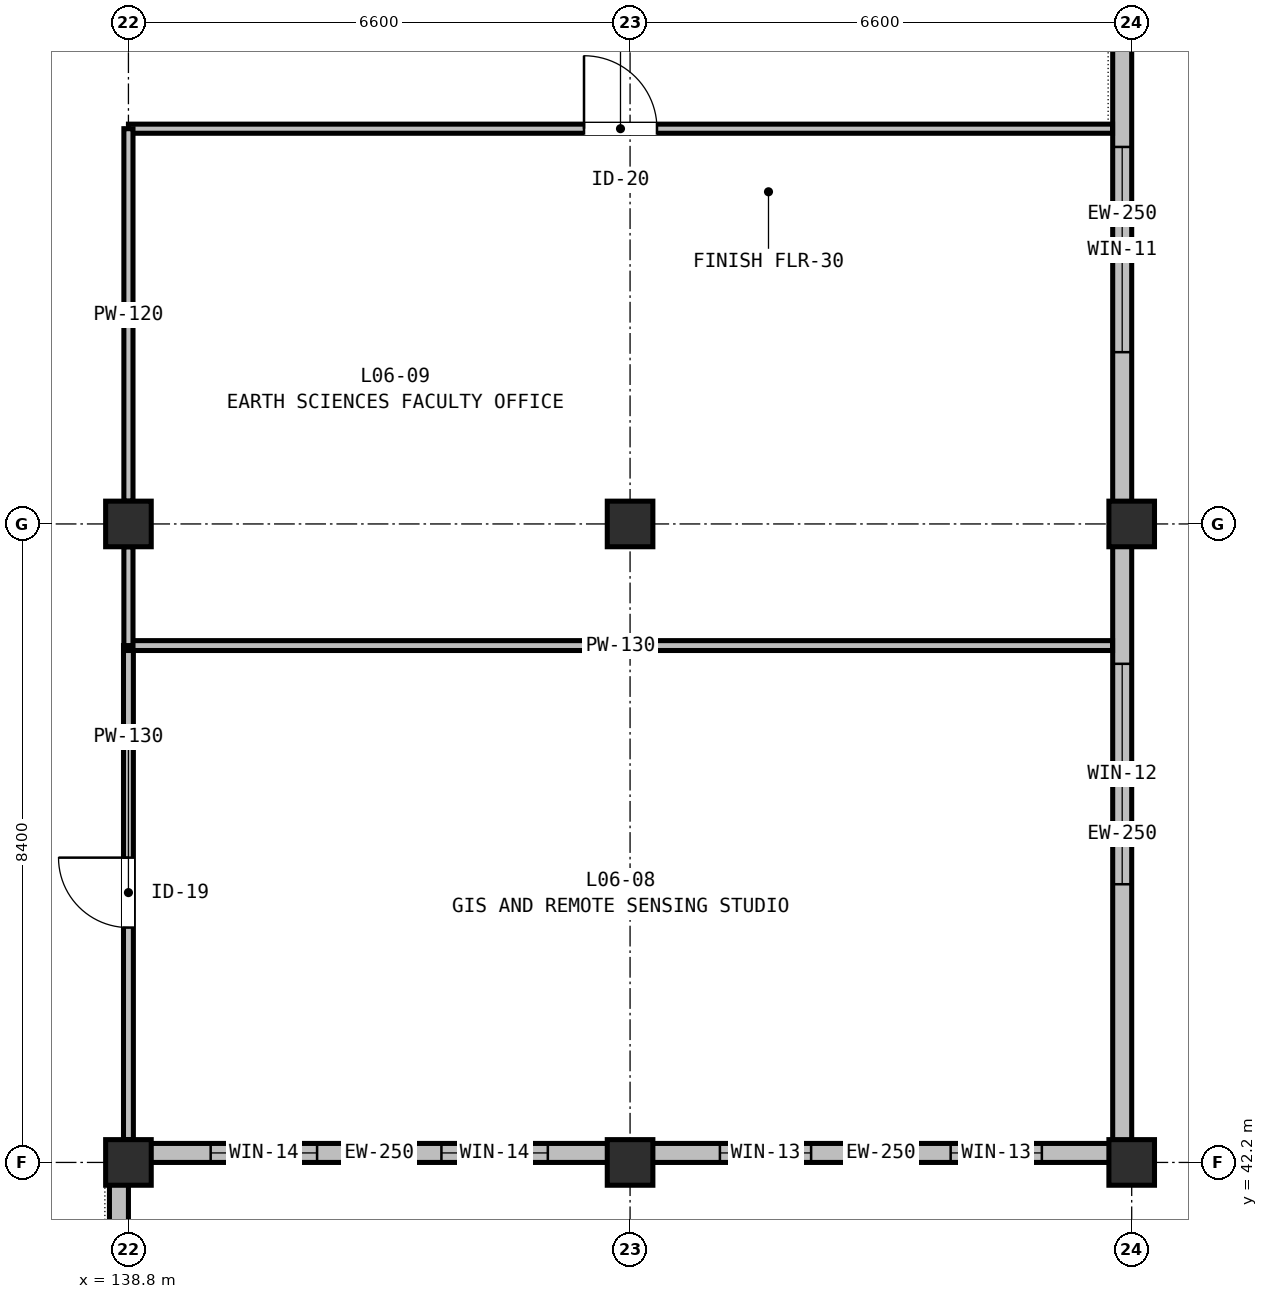
"""IFC4 building model, lengths in metres.
Left out: names, types, materials, properties, quantities, classifications, styles, units other than length and angle.
Written with IfcOpenShell. Run it as: python <this file> out.ifc"""

import sys

from ifc_helpers import new_model, si_unit, direction, frame, frame_2d, origin, origin_2d, place, context, subcontext, project, spatial, rectangle, extrude, element, fill, save


model = new_model("IFC4")
c1 = context("Model", 3, precision=1e-05, world=origin(), true_north=direction((0.0, 1.0)))
c2 = subcontext(c1, "Body", "Model", "MODEL_VIEW")
j1 = project(units=[si_unit("LENGTHUNIT", "METRE"), si_unit("PLANEANGLEUNIT", "RADIAN")], contexts=[c1])
p1 = place(None, origin())
s1 = spatial("IfcSite", under=j1, at=p1, CompositionType="ELEMENT")
p2 = place(p1, origin())
s2 = spatial("IfcBuilding", under=s1, at=p2, CompositionType="ELEMENT")
p3 = place(p2, frame((0.0, 0.0, 28.5)))
s3 = spatial("IfcBuildingStorey", under=s2, at=p3, CompositionType="ELEMENT", Elevation=28.5)
for number, where, z_axis, x_axis in (
    (1, (138.8, 42.2, 0.0), (0.0, 0.0, 1.0), (1.0, 0.0, 0.0)),
    (2, (138.8, 50.6, 0.0), (0.0, 0.0, 1.0), (1.0, 0.0, 0.0)),
    (3, (145.4, 42.2, 0.0), (0.0, 0.0, 1.0), (1.0, 0.0, 0.0)),
    (4, (145.4, 50.6, 0.0), (0.0, 0.0, 1.0), (1.0, 0.0, 0.0)),
    (5, (152.0, 42.2, 0.0), (0.0, 0.0, 1.0), (1.0, 0.0, 0.0)),
    (6, (152.0, 50.6, 0.0), (0.0, 0.0, 1.0), (1.0, 0.0, 0.0)),
):
    element("IfcColumn", number, at=place(p3, frame(where, z_axis=z_axis, x_axis=x_axis)), inside=s3, PredefinedType="COLUMN", context=c2, shape_type="SweptSolid", body=[
        extrude(rectangle(XDim=0.6, YDim=0.6, at=origin_2d()), origin(), (0.0, 0.0, 1.0), 4.14),
    ])
p4 = place(p3, frame((151.875, 58.75, 0.0), z_axis=(0.0, 0.0, 1.0), x_axis=(0.0, -1.0, 0.0)))
e7 = element("IfcWall", 7, at=p4, inside=s3, PredefinedType="STANDARD", context=c2, shape_type="SweptSolid", body=[
    extrude(rectangle(XDim=8.15, YDim=0.25, at=frame_2d((4.075, 0.0))), origin(), (0.0, 0.0, 1.0), 3.585),
])
p5 = place(p4, frame((3.19, 0.0, 0.75)))
e8 = element("IfcOpeningElement", 8, at=p5, cuts=e7, PredefinedType="OPENING", context=c2, shape_type="SweptSolid", body=[
    extrude(rectangle(XDim=2.7, YDim=2.2, at=frame_2d((1.35, 1.1))), frame((0.0, 0.135, 0.0), z_axis=(0.0, -1.0, 0.0), x_axis=(1.0, 0.0, 0.0)), (0.0, 0.0, 1.0), 0.27),
])
p6 = place(p3, frame((151.875, 50.6, 0.0), z_axis=(0.0, 0.0, 1.0), x_axis=(0.0, -1.0, 0.0)))
e9 = element("IfcWall", 9, at=p6, inside=s3, PredefinedType="STANDARD", context=c2, shape_type="SweptSolid", body=[
    extrude(rectangle(XDim=8.15, YDim=0.25, at=frame_2d((4.075, 0.0))), origin(), (0.0, 0.0, 1.0), 3.585),
])
p7 = place(p6, frame((1.84, 0.0, 0.75)))
e10 = element("IfcOpeningElement", 10, at=p7, cuts=e9, PredefinedType="OPENING", context=c2, shape_type="SweptSolid", body=[
    extrude(rectangle(XDim=2.9, YDim=2.2, at=frame_2d((1.45, 1.1))), frame((0.0, 0.135, 0.0), z_axis=(0.0, -1.0, 0.0), x_axis=(1.0, 0.0, 0.0)), (0.0, 0.0, 1.0), 0.27),
])
p8 = place(p3, frame((152.0, 42.325, 0.0), z_axis=(0.0, 0.0, 1.0), x_axis=(-1.0, 0.0, 0.0)))
e11 = element("IfcWall", 11, at=p8, inside=s3, PredefinedType="STANDARD", context=c2, shape_type="SweptSolid", body=[
    extrude(rectangle(XDim=6.6, YDim=0.25, at=frame_2d((3.3, 0.0))), origin(), (0.0, 0.0, 1.0), 3.435),
])
p9 = place(p8, frame((1.182, 0.0, 0.9)))
e12 = element("IfcOpeningElement", 12, at=p9, cuts=e11, PredefinedType="OPENING", context=c2, shape_type="SweptSolid", body=[
    extrude(rectangle(XDim=1.2, YDim=1.5, at=frame_2d((0.6, 0.75))), frame((0.0, 0.135, 0.0), z_axis=(0.0, -1.0, 0.0), x_axis=(1.0, 0.0, 0.0)), (0.0, 0.0, 1.0), 0.27),
])
p10 = place(p8, frame((4.218, 0.0, 0.9)))
e13 = element("IfcOpeningElement", 13, at=p10, cuts=e11, PredefinedType="OPENING", context=c2, shape_type="SweptSolid", body=[
    extrude(rectangle(XDim=1.2, YDim=1.5, at=frame_2d((0.6, 0.75))), frame((0.0, 0.135, 0.0), z_axis=(0.0, -1.0, 0.0), x_axis=(1.0, 0.0, 0.0)), (0.0, 0.0, 1.0), 0.27),
])
p11 = place(p3, frame((145.4, 42.325, 0.0), z_axis=(0.0, 0.0, 1.0), x_axis=(-1.0, 0.0, 0.0)))
e14 = element("IfcWall", 14, at=p11, inside=s3, PredefinedType="STANDARD", context=c2, shape_type="SweptSolid", body=[
    extrude(rectangle(XDim=6.6, YDim=0.25, at=frame_2d((3.3, 0.0))), origin(), (0.0, 0.0, 1.0), 3.435),
])
p12 = place(p11, frame((1.082, 0.0, 0.9)))
e15 = element("IfcOpeningElement", 15, at=p12, cuts=e14, PredefinedType="OPENING", context=c2, shape_type="SweptSolid", body=[
    extrude(rectangle(XDim=1.4, YDim=1.55, at=frame_2d((0.7, 0.775))), frame((0.0, 0.135, 0.0), z_axis=(0.0, -1.0, 0.0), x_axis=(1.0, 0.0, 0.0)), (0.0, 0.0, 1.0), 0.27),
])
p13 = place(p11, frame((4.118, 0.0, 0.9)))
e16 = element("IfcOpeningElement", 16, at=p13, cuts=e14, PredefinedType="OPENING", context=c2, shape_type="SweptSolid", body=[
    extrude(rectangle(XDim=1.4, YDim=1.55, at=frame_2d((0.7, 0.775))), frame((0.0, 0.135, 0.0), z_axis=(0.0, -1.0, 0.0), x_axis=(1.0, 0.0, 0.0)), (0.0, 0.0, 1.0), 0.27),
])
p14 = place(p3, frame((138.675, 41.95, 0.0), z_axis=(0.0, 0.0, 1.0), x_axis=(0.0, -1.0, 0.0)))
e17 = element("IfcWall", 17, at=p14, inside=s3, PredefinedType="STANDARD", context=c2, shape_type="SweptSolid", body=[
    extrude(rectangle(XDim=7.9, YDim=0.25, at=frame_2d((3.95, 0.0))), origin(), (0.0, 0.0, 1.0), 3.585),
])
p15 = place(p14, frame((1.333, 0.0, 0.9)))
e18 = element("IfcOpeningElement", 18, at=p15, cuts=e17, PredefinedType="OPENING", context=c2, shape_type="SweptSolid", body=[
    extrude(rectangle(XDim=1.6, YDim=1.6, at=frame_2d((0.8, 0.8))), frame((0.0, 0.135, 0.0), z_axis=(0.0, -1.0, 0.0), x_axis=(1.0, 0.0, 0.0)), (0.0, 0.0, 1.0), 0.27),
])
p16 = place(p14, frame((4.967, 0.0, 0.9)))
e19 = element("IfcOpeningElement", 19, at=p16, cuts=e17, PredefinedType="OPENING", context=c2, shape_type="SweptSolid", body=[
    extrude(rectangle(XDim=1.6, YDim=1.6, at=frame_2d((0.8, 0.8))), frame((0.0, 0.135, 0.0), z_axis=(0.0, -1.0, 0.0), x_axis=(1.0, 0.0, 0.0)), (0.0, 0.0, 1.0), 0.27),
])
p17 = place(p3, frame((138.8, 42.5, 0.0), z_axis=(0.0, 0.0, 1.0), x_axis=(0.0, 1.0, 0.0)))
e20 = element("IfcWall", 20, at=p17, inside=s3, PredefinedType="PARTITIONING", context=c2, shape_type="SweptSolid", body=[
    extrude(rectangle(XDim=6.5, YDim=0.13, at=frame_2d((3.25, 0.0))), origin(), (0.0, 0.0, 1.0), 3.435),
])
p18 = place(p17, frame((2.79, 0.0, 0.0)))
e21 = element("IfcOpeningElement", 21, at=p18, cuts=e20, PredefinedType="OPENING", context=c2, shape_type="SweptSolid", body=[
    extrude(rectangle(XDim=0.92, YDim=2.14, at=frame_2d((0.46, 1.07))), frame((0.0, 0.075, 0.0), z_axis=(0.0, -1.0, 0.0), x_axis=(1.0, 0.0, 0.0)), (0.0, 0.0, 1.0), 0.15),
])
p19 = place(p3, frame((138.8, 49.0, 0.0), z_axis=(0.0, 0.0, 1.0), x_axis=(1.0, 0.0, 0.0)))
e22 = element("IfcWall", 22, at=p19, inside=s3, PredefinedType="PARTITIONING", context=c2, shape_type="SweptSolid", body=[
    extrude(rectangle(XDim=12.948, YDim=0.13, at=frame_2d((6.474, 0.0))), origin(), (0.0, 0.0, 1.0), 3.435),
])
p20 = place(p3, frame((138.8, 55.8, 0.0), z_axis=(0.0, 0.0, 1.0), x_axis=(1.0, 0.0, 0.0)))
e23 = element("IfcWall", 23, at=p20, inside=s3, PredefinedType="PARTITIONING", context=c2, shape_type="SweptSolid", body=[
    extrude(rectangle(XDim=12.948, YDim=0.12, at=frame_2d((6.474, 0.0))), origin(), (0.0, 0.0, 1.0), 3.435),
])
p21 = place(p20, frame((5.994, 0.0, 0.0)))
e24 = element("IfcOpeningElement", 24, at=p21, cuts=e23, PredefinedType="OPENING", context=c2, shape_type="SweptSolid", body=[
    extrude(rectangle(XDim=0.96, YDim=2.14, at=frame_2d((0.48, 1.07))), frame((0.0, 0.07, 0.0), z_axis=(0.0, -1.0, 0.0), x_axis=(1.0, 0.0, 0.0)), (0.0, 0.0, 1.0), 0.14),
])
p22 = place(p3, frame((138.8, 49.0, 0.0), z_axis=(0.0, 0.0, 1.0), x_axis=(0.0, 1.0, 0.0)))
e25 = element("IfcWall", 25, at=p22, inside=s3, PredefinedType="PARTITIONING", context=c2, shape_type="SweptSolid", body=[
    extrude(rectangle(XDim=1.3, YDim=0.12, at=frame_2d((0.65, 0.0))), origin(), (0.0, 0.0, 1.0), 3.435),
])
p23 = place(p3, frame((138.8, 50.9, 0.0), z_axis=(0.0, 0.0, 1.0), x_axis=(0.0, 1.0, 0.0)))
e26 = element("IfcWall", 26, at=p23, inside=s3, PredefinedType="PARTITIONING", context=c2, shape_type="SweptSolid", body=[
    extrude(rectangle(XDim=4.9, YDim=0.12, at=frame_2d((2.45, 0.0))), origin(), (0.0, 0.0, 1.0), 3.435),
])
p24 = place(p5, origin())
e27 = element("IfcWindow", 27, at=p24, inside=s3, PartitioningType="SINGLE_PANEL", PredefinedType="WINDOW", context=c2, shape_type="SweptSolid", body=[
    extrude(rectangle(XDim=2.7, YDim=2.2, at=frame_2d((1.35, 1.1))), frame((0.0, 0.03, 0.0), z_axis=(0.0, -1.0, 0.0), x_axis=(1.0, 0.0, 0.0)), (0.0, 0.0, 1.0), 0.06),
])
fill(e8, e27)
p25 = place(p7, origin())
e28 = element("IfcWindow", 28, at=p25, inside=s3, PartitioningType="SINGLE_PANEL", PredefinedType="WINDOW", context=c2, shape_type="SweptSolid", body=[
    extrude(rectangle(XDim=2.9, YDim=2.2, at=frame_2d((1.45, 1.1))), frame((0.0, 0.03, 0.0), z_axis=(0.0, -1.0, 0.0), x_axis=(1.0, 0.0, 0.0)), (0.0, 0.0, 1.0), 0.06),
])
fill(e10, e28)
p26 = place(p9, origin())
e29 = element("IfcWindow", 29, at=p26, inside=s3, PartitioningType="SINGLE_PANEL", PredefinedType="WINDOW", context=c2, shape_type="SweptSolid", body=[
    extrude(rectangle(XDim=1.2, YDim=1.5, at=frame_2d((0.6, 0.75))), frame((0.0, 0.03, 0.0), z_axis=(0.0, -1.0, 0.0), x_axis=(1.0, 0.0, 0.0)), (0.0, 0.0, 1.0), 0.06),
])
fill(e12, e29)
p27 = place(p10, origin())
e30 = element("IfcWindow", 30, at=p27, inside=s3, PartitioningType="SINGLE_PANEL", PredefinedType="WINDOW", context=c2, shape_type="SweptSolid", body=[
    extrude(rectangle(XDim=1.2, YDim=1.5, at=frame_2d((0.6, 0.75))), frame((0.0, 0.03, 0.0), z_axis=(0.0, -1.0, 0.0), x_axis=(1.0, 0.0, 0.0)), (0.0, 0.0, 1.0), 0.06),
])
fill(e13, e30)
p28 = place(p12, origin())
e31 = element("IfcWindow", 31, at=p28, inside=s3, PartitioningType="SINGLE_PANEL", PredefinedType="WINDOW", context=c2, shape_type="SweptSolid", body=[
    extrude(rectangle(XDim=1.4, YDim=1.55, at=frame_2d((0.7, 0.775))), frame((0.0, 0.03, 0.0), z_axis=(0.0, -1.0, 0.0), x_axis=(1.0, 0.0, 0.0)), (0.0, 0.0, 1.0), 0.06),
])
fill(e15, e31)
p29 = place(p13, origin())
e32 = element("IfcWindow", 32, at=p29, inside=s3, PartitioningType="SINGLE_PANEL", PredefinedType="WINDOW", context=c2, shape_type="SweptSolid", body=[
    extrude(rectangle(XDim=1.4, YDim=1.55, at=frame_2d((0.7, 0.775))), frame((0.0, 0.03, 0.0), z_axis=(0.0, -1.0, 0.0), x_axis=(1.0, 0.0, 0.0)), (0.0, 0.0, 1.0), 0.06),
])
fill(e16, e32)
p30 = place(p18, origin())
e33 = element("IfcDoor", 33, at=p30, inside=s3, OperationType="SINGLE_SWING_RIGHT", PredefinedType="DOOR", context=c2, shape_type="SweptSolid", body=[
    extrude(rectangle(XDim=0.92, YDim=2.14, at=frame_2d((0.46, 1.07))), frame((0.0, 0.025, 0.0), z_axis=(0.0, -1.0, 0.0), x_axis=(1.0, 0.0, 0.0)), (0.0, 0.0, 1.0), 0.05),
])
fill(e21, e33)
p31 = place(p21, origin())
e34 = element("IfcDoor", 34, at=p31, inside=s3, OperationType="SINGLE_SWING_LEFT", PredefinedType="DOOR", context=c2, shape_type="SweptSolid", body=[
    extrude(rectangle(XDim=0.96, YDim=2.14, at=frame_2d((0.48, 1.07))), frame((0.0, 0.025, 0.0), z_axis=(0.0, -1.0, 0.0), x_axis=(1.0, 0.0, 0.0)), (0.0, 0.0, 1.0), 0.05),
])
fill(e24, e34)
save(model, sys.argv[1])
